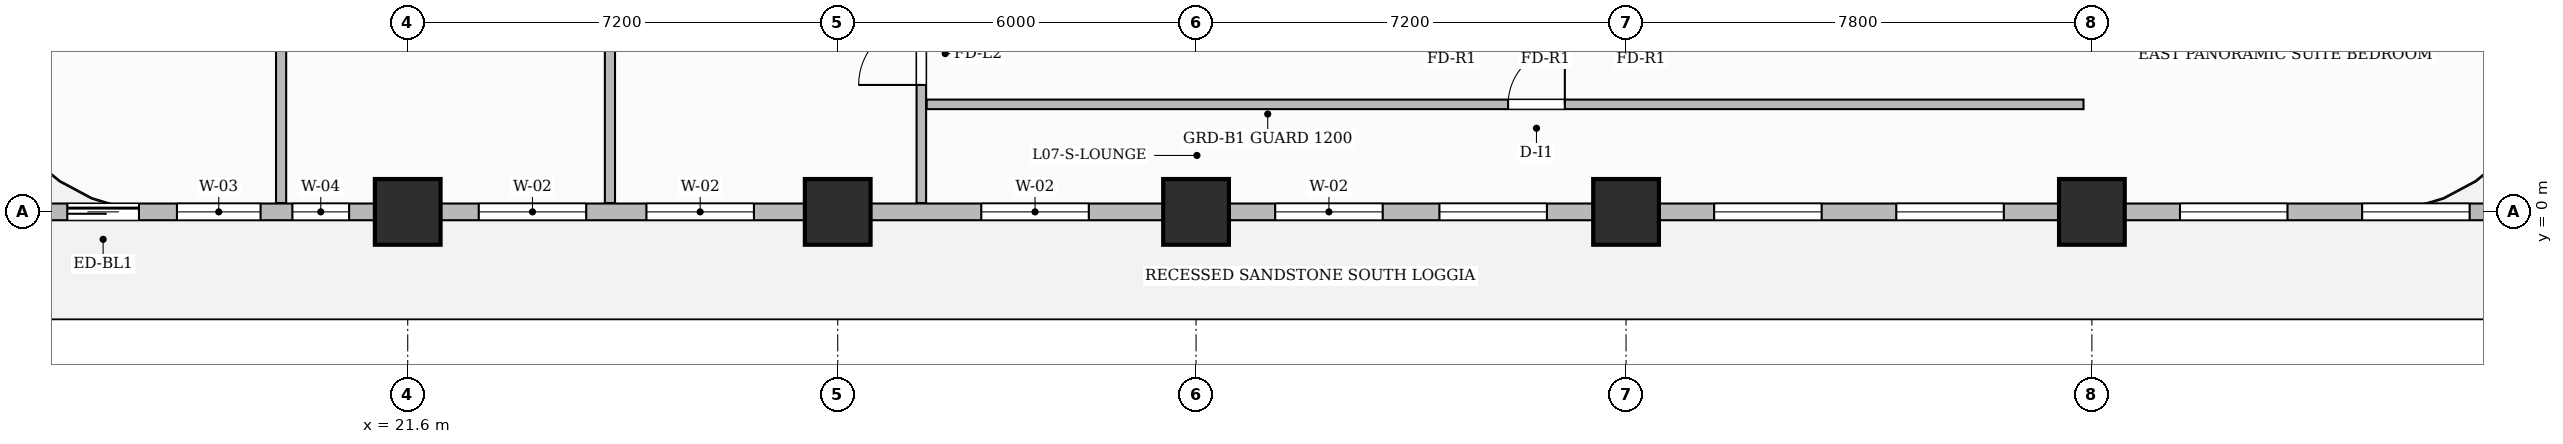
"""IFC4 building model, lengths in metres.
Left out: names, types, materials, properties, quantities, classifications, styles, units other than length and angle.
Written with IfcOpenShell. Run it as: python <this file> out.ifc"""

import sys

from ifc_helpers import new_model, si_unit, direction, frame, frame_2d, origin, origin_2d, place, context, subcontext, project, spatial, rectangle, extrude, source, transform, mapped, element, fill, save


model = new_model("IFC4")
c1 = context("Model", 3, precision=1e-05, world=origin(), true_north=direction((0.0, 1.0)))
c2 = subcontext(c1, "Body", "Model", "MODEL_VIEW")
j1 = project(units=[si_unit("LENGTHUNIT", "METRE"), si_unit("PLANEANGLEUNIT", "RADIAN")], contexts=[c1])
p1 = place(None, origin())
s1 = spatial("IfcSite", under=j1, at=p1, CompositionType="ELEMENT")
p2 = place(p1, origin())
s2 = spatial("IfcBuilding", under=s1, at=p2, CompositionType="ELEMENT")
p3 = place(p2, frame((0.0, 0.0, 36.1)))
s3 = spatial("IfcBuildingStorey", under=s2, at=p3, CompositionType="ELEMENT", Elevation=36.1)
m1 = source(origin(), c2, "Body", "SweptSolid", [
    extrude(rectangle(XDim=1.1, YDim=1.1, at=origin_2d()), origin(), (0.0, 0.0, 1.0), 3.7),
])
for number, where, z_axis, x_axis in (
    (1, (21.6, 0.0, 0.0), (0.0, 0.0, 1.0), (1.0, 0.0, 0.0)),
    (2, (28.8, 0.0, 0.0), (0.0, 0.0, 1.0), (1.0, 0.0, 0.0)),
    (3, (34.8, 0.0, 0.0), (0.0, 0.0, 1.0), (1.0, 0.0, 0.0)),
    (4, (42.0, 0.0, 0.0), (0.0, 0.0, 1.0), (1.0, 0.0, 0.0)),
    (5, (49.8, 0.0, 0.0), (0.0, 0.0, 1.0), (1.0, 0.0, 0.0)),
):
    element("IfcColumn", number, at=place(p3, frame(where, z_axis=z_axis, x_axis=x_axis)), inside=s3, PredefinedType="COLUMN", context=c2, shape_type="MappedRepresentation", body=[
        mapped(m1, transform((0.0, 0.0, 0.0), scale=1.0)),
    ])
p4 = place(p3, frame((30.2, 0.148, 0.0), z_axis=(0.0, 0.0, 1.0), x_axis=(0.0, 1.0, 0.0)))
e6 = element("IfcWall", 6, at=p4, inside=s3, PredefinedType="PARTITIONING", context=c2, shape_type="SweptSolid", body=[
    extrude(rectangle(XDim=8.912, YDim=0.16, at=frame_2d((4.456, 0.0))), origin(), (0.0, 0.0, 1.0), 3.45),
])
p5 = place(p4, frame((1.977, 0.0, 0.0)))
e7 = element("IfcOpeningElement", 7, at=p5, cuts=e6, PredefinedType="OPENING", context=c2, shape_type="SweptSolid", body=[
    extrude(rectangle(XDim=1.05, YDim=2.15, at=frame_2d((0.525, 1.075))), frame((0.0, 0.09, 0.0), z_axis=(0.0, -1.0, 0.0), x_axis=(1.0, 0.0, 0.0)), (0.0, 0.0, 1.0), 0.18),
])
p6 = place(p3, frame((30.29, 1.8, 0.0), z_axis=(0.0, 0.0, 1.0), x_axis=(1.0, 0.0, 0.0)))
e8 = element("IfcWall", 8, at=p6, inside=s3, PredefinedType="PARTITIONING", context=c2, shape_type="SweptSolid", body=[
    extrude(rectangle(XDim=19.37, YDim=0.16, at=frame_2d((9.685, 0.0))), origin(), (0.0, 0.0, 1.0), 3.45),
])
p7 = place(p6, frame((9.735, 0.0, 0.0)))
e9 = element("IfcOpeningElement", 9, at=p7, cuts=e8, PredefinedType="OPENING", context=c2, shape_type="SweptSolid", body=[
    extrude(rectangle(XDim=0.95, YDim=2.15, at=frame_2d((0.475, 1.075))), frame((0.0, 0.09, 0.0), z_axis=(0.0, -1.0, 0.0), x_axis=(1.0, 0.0, 0.0)), (0.0, 0.0, 1.0), 0.18),
])
p8 = place(p3, frame((19.48, 0.148, 0.0), z_axis=(0.0, 0.0, 1.0), x_axis=(0.0, 1.0, 0.0)))
e10 = element("IfcWall", 10, at=p8, inside=s3, PredefinedType="PARTITIONING", context=c2, shape_type="SweptSolid", body=[
    extrude(rectangle(XDim=8.912, YDim=0.17, at=frame_2d((4.456, 0.0))), origin(), (0.0, 0.0, 1.0), 3.45),
])
p9 = place(p3, frame((24.986, 0.148, 0.0), z_axis=(0.0, 0.0, 1.0), x_axis=(0.0, 1.0, 0.0)))
e11 = element("IfcWall", 11, at=p9, inside=s3, PredefinedType="PARTITIONING", context=c2, shape_type="SweptSolid", body=[
    extrude(rectangle(XDim=8.912, YDim=0.17, at=frame_2d((4.456, 0.0))), origin(), (0.0, 0.0, 1.0), 3.035),
])
p10 = place(p3, frame((14.4, 0.0, 0.0), z_axis=(0.0, 0.0, 1.0), x_axis=(1.0, 0.0, 0.0)))
e12 = element("IfcWall", 12, at=p10, inside=s3, PredefinedType="SOLIDWALL", context=c2, shape_type="SweptSolid", body=[
    extrude(rectangle(XDim=43.2, YDim=0.28, at=frame_2d((21.6, 0.0))), origin(), (0.0, 0.0, 1.0), 2.885),
])
p11 = place(p10, frame((1.5, 0.0, 0.0)))
e13 = element("IfcOpeningElement", 13, at=p11, cuts=e12, PredefinedType="OPENING", context=c2, shape_type="SweptSolid", body=[
    extrude(rectangle(XDim=1.2, YDim=2.2, at=frame_2d((0.6, 1.1))), frame((0.0, 0.15, 0.0), z_axis=(0.0, -1.0, 0.0), x_axis=(1.0, 0.0, 0.0)), (0.0, 0.0, 1.0), 0.3),
])
p12 = place(p10, frame((3.336, 0.0, 0.8)))
e14 = element("IfcOpeningElement", 14, at=p12, cuts=e12, PredefinedType="OPENING", context=c2, shape_type="SweptSolid", body=[
    extrude(rectangle(XDim=1.4, YDim=1.85, at=frame_2d((0.7, 0.925))), frame((0.0, 0.15, 0.0), z_axis=(0.0, -1.0, 0.0), x_axis=(1.0, 0.0, 0.0)), (0.0, 0.0, 1.0), 0.3),
])
p13 = place(p10, frame((5.269, 0.0, 0.8)))
e15 = element("IfcOpeningElement", 15, at=p13, cuts=e12, PredefinedType="OPENING", context=c2, shape_type="SweptSolid", body=[
    extrude(rectangle(XDim=0.95, YDim=1.75, at=frame_2d((0.475, 0.875))), frame((0.0, 0.15, 0.0), z_axis=(0.0, -1.0, 0.0), x_axis=(1.0, 0.0, 0.0)), (0.0, 0.0, 1.0), 0.3),
])
p14 = place(p10, frame((8.389, 0.0, 0.8)))
e16 = element("IfcOpeningElement", 16, at=p14, cuts=e12, PredefinedType="OPENING", context=c2, shape_type="SweptSolid", body=[
    extrude(rectangle(XDim=1.8, YDim=1.85, at=frame_2d((0.9, 0.925))), frame((0.0, 0.15, 0.0), z_axis=(0.0, -1.0, 0.0), x_axis=(1.0, 0.0, 0.0)), (0.0, 0.0, 1.0), 0.3),
])
p15 = place(p10, frame((11.197, 0.0, 0.8)))
e17 = element("IfcOpeningElement", 17, at=p15, cuts=e12, PredefinedType="OPENING", context=c2, shape_type="SweptSolid", body=[
    extrude(rectangle(XDim=1.8, YDim=1.85, at=frame_2d((0.9, 0.925))), frame((0.0, 0.15, 0.0), z_axis=(0.0, -1.0, 0.0), x_axis=(1.0, 0.0, 0.0)), (0.0, 0.0, 1.0), 0.3),
])
p16 = place(p10, frame((16.804, 0.0, 0.8)))
e18 = element("IfcOpeningElement", 18, at=p16, cuts=e12, PredefinedType="OPENING", context=c2, shape_type="SweptSolid", body=[
    extrude(rectangle(XDim=1.8, YDim=1.85, at=frame_2d((0.9, 0.925))), frame((0.0, 0.15, 0.0), z_axis=(0.0, -1.0, 0.0), x_axis=(1.0, 0.0, 0.0)), (0.0, 0.0, 1.0), 0.3),
])
p17 = place(p10, frame((21.725, 0.0, 0.8)))
e19 = element("IfcOpeningElement", 19, at=p17, cuts=e12, PredefinedType="OPENING", context=c2, shape_type="SweptSolid", body=[
    extrude(rectangle(XDim=1.8, YDim=1.85, at=frame_2d((0.9, 0.925))), frame((0.0, 0.15, 0.0), z_axis=(0.0, -1.0, 0.0), x_axis=(1.0, 0.0, 0.0)), (0.0, 0.0, 1.0), 0.3),
])
p18 = place(p10, frame((24.475, 0.0, 0.8)))
e20 = element("IfcOpeningElement", 20, at=p18, cuts=e12, PredefinedType="OPENING", context=c2, shape_type="SweptSolid", body=[
    extrude(rectangle(XDim=1.8, YDim=1.85, at=frame_2d((0.9, 0.925))), frame((0.0, 0.15, 0.0), z_axis=(0.0, -1.0, 0.0), x_axis=(1.0, 0.0, 0.0)), (0.0, 0.0, 1.0), 0.3),
])
p19 = place(p10, frame((29.075, 0.0, 0.8)))
e21 = element("IfcOpeningElement", 21, at=p19, cuts=e12, PredefinedType="OPENING", context=c2, shape_type="SweptSolid", body=[
    extrude(rectangle(XDim=1.8, YDim=1.85, at=frame_2d((0.9, 0.925))), frame((0.0, 0.15, 0.0), z_axis=(0.0, -1.0, 0.0), x_axis=(1.0, 0.0, 0.0)), (0.0, 0.0, 1.0), 0.3),
])
p20 = place(p10, frame((32.125, 0.0, 0.8)))
e22 = element("IfcOpeningElement", 22, at=p20, cuts=e12, PredefinedType="OPENING", context=c2, shape_type="SweptSolid", body=[
    extrude(rectangle(XDim=1.8, YDim=1.85, at=frame_2d((0.9, 0.925))), frame((0.0, 0.15, 0.0), z_axis=(0.0, -1.0, 0.0), x_axis=(1.0, 0.0, 0.0)), (0.0, 0.0, 1.0), 0.3),
])
p21 = place(p10, frame((36.875, 0.0, 0.8)))
e23 = element("IfcOpeningElement", 23, at=p21, cuts=e12, PredefinedType="OPENING", context=c2, shape_type="SweptSolid", body=[
    extrude(rectangle(XDim=1.8, YDim=1.85, at=frame_2d((0.9, 0.925))), frame((0.0, 0.15, 0.0), z_axis=(0.0, -1.0, 0.0), x_axis=(1.0, 0.0, 0.0)), (0.0, 0.0, 1.0), 0.3),
])
p22 = place(p10, frame((39.925, 0.0, 0.8)))
e24 = element("IfcOpeningElement", 24, at=p22, cuts=e12, PredefinedType="OPENING", context=c2, shape_type="SweptSolid", body=[
    extrude(rectangle(XDim=1.8, YDim=1.85, at=frame_2d((0.9, 0.925))), frame((0.0, 0.15, 0.0), z_axis=(0.0, -1.0, 0.0), x_axis=(1.0, 0.0, 0.0)), (0.0, 0.0, 1.0), 0.3),
])
m2 = source(origin(), c2, "Body", "SweptSolid", [
    extrude(rectangle(XDim=1.05, YDim=2.15, at=frame_2d((0.525, 1.075))), frame((0.0, 0.025, 0.0), z_axis=(0.0, -1.0, 0.0), x_axis=(1.0, 0.0, 0.0)), (0.0, 0.0, 1.0), 0.05),
])
p23 = place(p5, origin())
e25 = element("IfcDoor", 25, at=p23, inside=s3, OperationType="SINGLE_SWING_LEFT", PredefinedType="DOOR", context=c2, shape_type="MappedRepresentation", body=[
    mapped(m2, transform((0.0, 0.0, 0.0), scale=1.0)),
])
fill(e7, e25)
m3 = source(origin(), c2, "Body", "SweptSolid", [
    extrude(rectangle(XDim=0.95, YDim=2.15, at=frame_2d((0.475, 1.075))), frame((0.0, 0.025, 0.0), z_axis=(0.0, -1.0, 0.0), x_axis=(1.0, 0.0, 0.0)), (0.0, 0.0, 1.0), 0.05),
])
p24 = place(p7, origin())
e26 = element("IfcDoor", 26, at=p24, inside=s3, OperationType="SINGLE_SWING_RIGHT", PredefinedType="DOOR", context=c2, shape_type="MappedRepresentation", body=[
    mapped(m3, transform((0.0, 0.0, 0.0), scale=1.0)),
])
fill(e9, e26)
m4 = source(origin(), c2, "Body", "SweptSolid", [
    extrude(rectangle(XDim=1.2, YDim=2.2, at=frame_2d((0.6, 1.1))), frame((0.0, 0.025, 0.0), z_axis=(0.0, -1.0, 0.0), x_axis=(1.0, 0.0, 0.0)), (0.0, 0.0, 1.0), 0.05),
])
p25 = place(p11, origin())
e27 = element("IfcDoor", 27, at=p25, inside=s3, OperationType="SLIDING_TO_LEFT", PredefinedType="DOOR", context=c2, shape_type="MappedRepresentation", body=[
    mapped(m4, transform((0.0, 0.0, 0.0), scale=1.0)),
])
fill(e13, e27)
m5 = source(origin(), c2, "Body", "SweptSolid", [
    extrude(rectangle(XDim=1.4, YDim=1.85, at=frame_2d((0.7, 0.925))), frame((0.0, 0.03, 0.0), z_axis=(0.0, -1.0, 0.0), x_axis=(1.0, 0.0, 0.0)), (0.0, 0.0, 1.0), 0.06),
])
p26 = place(p12, origin())
e28 = element("IfcWindow", 28, at=p26, inside=s3, PartitioningType="SINGLE_PANEL", PredefinedType="WINDOW", context=c2, shape_type="MappedRepresentation", body=[
    mapped(m5, transform((0.0, 0.0, 0.0), scale=1.0)),
])
fill(e14, e28)
m6 = source(origin(), c2, "Body", "SweptSolid", [
    extrude(rectangle(XDim=0.95, YDim=1.75, at=frame_2d((0.475, 0.875))), frame((0.0, 0.03, 0.0), z_axis=(0.0, -1.0, 0.0), x_axis=(1.0, 0.0, 0.0)), (0.0, 0.0, 1.0), 0.06),
])
p27 = place(p13, origin())
e29 = element("IfcWindow", 29, at=p27, inside=s3, PartitioningType="SINGLE_PANEL", PredefinedType="WINDOW", context=c2, shape_type="MappedRepresentation", body=[
    mapped(m6, transform((0.0, 0.0, 0.0), scale=1.0)),
])
fill(e15, e29)
m7 = source(origin(), c2, "Body", "SweptSolid", [
    extrude(rectangle(XDim=1.8, YDim=1.85, at=frame_2d((0.9, 0.925))), frame((0.0, 0.03, 0.0), z_axis=(0.0, -1.0, 0.0), x_axis=(1.0, 0.0, 0.0)), (0.0, 0.0, 1.0), 0.06),
])
p28 = place(p14, origin())
e30 = element("IfcWindow", 30, at=p28, inside=s3, PartitioningType="DOUBLE_PANEL_VERTICAL", PredefinedType="WINDOW", context=c2, shape_type="MappedRepresentation", body=[
    mapped(m7, transform((0.0, 0.0, 0.0), scale=1.0)),
])
fill(e16, e30)
p29 = place(p15, origin())
e31 = element("IfcWindow", 31, at=p29, inside=s3, PartitioningType="DOUBLE_PANEL_VERTICAL", PredefinedType="WINDOW", context=c2, shape_type="MappedRepresentation", body=[
    mapped(m7, transform((0.0, 0.0, 0.0), scale=1.0)),
])
fill(e17, e31)
p30 = place(p16, origin())
e32 = element("IfcWindow", 32, at=p30, inside=s3, PartitioningType="DOUBLE_PANEL_VERTICAL", PredefinedType="WINDOW", context=c2, shape_type="MappedRepresentation", body=[
    mapped(m7, transform((0.0, 0.0, 0.0), scale=1.0)),
])
fill(e18, e32)
p31 = place(p17, origin())
e33 = element("IfcWindow", 33, at=p31, inside=s3, PartitioningType="DOUBLE_PANEL_VERTICAL", PredefinedType="WINDOW", context=c2, shape_type="MappedRepresentation", body=[
    mapped(m7, transform((0.0, 0.0, 0.0), scale=1.0)),
])
fill(e19, e33)
p32 = place(p18, origin())
e34 = element("IfcWindow", 34, at=p32, inside=s3, PartitioningType="DOUBLE_PANEL_VERTICAL", PredefinedType="WINDOW", context=c2, shape_type="MappedRepresentation", body=[
    mapped(m7, transform((0.0, 0.0, 0.0), scale=1.0)),
])
fill(e20, e34)
p33 = place(p19, origin())
e35 = element("IfcWindow", 35, at=p33, inside=s3, PartitioningType="DOUBLE_PANEL_VERTICAL", PredefinedType="WINDOW", context=c2, shape_type="MappedRepresentation", body=[
    mapped(m7, transform((0.0, 0.0, 0.0), scale=1.0)),
])
fill(e21, e35)
p34 = place(p20, origin())
e36 = element("IfcWindow", 36, at=p34, inside=s3, PartitioningType="DOUBLE_PANEL_VERTICAL", PredefinedType="WINDOW", context=c2, shape_type="MappedRepresentation", body=[
    mapped(m7, transform((0.0, 0.0, 0.0), scale=1.0)),
])
fill(e22, e36)
p35 = place(p21, origin())
e37 = element("IfcWindow", 37, at=p35, inside=s3, PartitioningType="DOUBLE_PANEL_VERTICAL", PredefinedType="WINDOW", context=c2, shape_type="MappedRepresentation", body=[
    mapped(m7, transform((0.0, 0.0, 0.0), scale=1.0)),
])
fill(e23, e37)
p36 = place(p22, origin())
e38 = element("IfcWindow", 38, at=p36, inside=s3, PartitioningType="DOUBLE_PANEL_VERTICAL", PredefinedType="WINDOW", context=c2, shape_type="MappedRepresentation", body=[
    mapped(m7, transform((0.0, 0.0, 0.0), scale=1.0)),
])
fill(e24, e38)
save(model, sys.argv[1])
